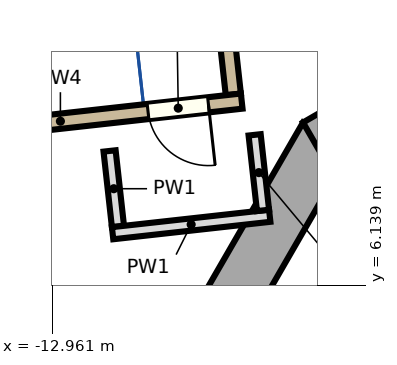
"""IFC4 building model, lengths in metres.
Left out: names, types, materials, properties, quantities, classifications, styles, units other than length and angle.
Written with IfcOpenShell. Run it as: python <this file> out.ifc"""

import sys

from ifc_helpers import new_model, si_unit, direction, frame, frame_2d, origin, place, context, subcontext, project, spatial, rectangle, extrude, element, fill, save


model = new_model("IFC4")
c1 = context("Model", 3, precision=1e-05, world=origin(), true_north=direction((0.0, 1.0)))
c2 = subcontext(c1, "Body", "Model", "MODEL_VIEW")
j1 = project(units=[si_unit("LENGTHUNIT", "METRE"), si_unit("PLANEANGLEUNIT", "RADIAN")], contexts=[c1])
p1 = place(None, origin())
s1 = spatial("IfcSite", under=j1, at=p1, CompositionType="ELEMENT")
p2 = place(p1, origin())
s2 = spatial("IfcBuilding", under=s1, at=p2, CompositionType="ELEMENT")
p3 = place(p2, frame((0.0, 0.0, 37.0)))
s3 = spatial("IfcBuildingStorey", under=s2, at=p3, CompositionType="ELEMENT", Elevation=37.0)
p4 = place(p3, frame((-11.684, 3.01, 0.0), z_axis=(0.0, 0.0, 1.0), x_axis=(0.499990282633, 0.866031014036, 0.0)))
e1 = element("IfcWall", 1, at=p4, inside=s3, PredefinedType="SHEAR", context=c2, shape_type="SweptSolid", body=[
    extrude(rectangle(XDim=6.47, YDim=0.9, at=frame_2d((3.235, 0.0))), origin(), (0.0, 0.0, 1.0), 5.5),
])
p5 = place(p3, frame((-8.614, 8.449, 0.0), z_axis=(0.0, 0.0, 1.0), x_axis=(0.866026961591, 0.49999730179, 0.0)))
e2 = element("IfcWall", 2, at=p5, inside=s3, PredefinedType="SHEAR", context=c2, shape_type="SweptSolid", body=[
    extrude(rectangle(XDim=5.587, YDim=0.9, at=frame_2d((2.794, 0.0))), origin(), (0.0, 0.0, 1.0), 5.5),
])
p6 = place(p3, frame((-11.758, -8.28, 0.0), z_axis=(0.0, 0.0, 1.0), x_axis=(-0.110321610045, 0.993895941413, 0.0)))
e3 = element("IfcWall", 3, at=p6, inside=s3, PredefinedType="PARTITIONING", context=c2, shape_type="SweptSolid", body=[
    extrude(rectangle(XDim=16.577, YDim=0.2, at=frame_2d((8.289, 0.0))), origin(), (0.0, 0.0, 1.0), 4.3),
])
p7 = place(p3, frame((-11.882, 7.128, 0.0), z_axis=(0.0, 0.0, 1.0), x_axis=(-0.110367206513, 0.993890879185, 0.0)))
e4 = element("IfcWall", 4, at=p7, inside=s3, PredefinedType="PARTITIONING", context=c2, shape_type="SweptSolid", body=[
    extrude(rectangle(XDim=1.25, YDim=0.2, at=frame_2d((0.625, 0.0))), origin(), (0.0, 0.0, 1.0), 4.3),
])
p8 = place(p3, frame((-11.971, 7.018, 0.0), z_axis=(0.0, 0.0, 1.0), x_axis=(0.993895180132, 0.110328468272, 0.0)))
e5 = element("IfcWall", 5, at=p8, inside=s3, PredefinedType="PARTITIONING", context=c2, shape_type="SweptSolid", body=[
    extrude(rectangle(XDim=2.6, YDim=0.2, at=frame_2d((1.3, 0.0))), origin(), (0.0, 0.0, 1.0), 4.3),
])
p9 = place(p3, frame((-9.497, 7.393, 0.0), z_axis=(0.0, 0.0, 1.0), x_axis=(-0.110345783203, 0.993893257915, 0.0)))
e6 = element("IfcWall", 6, at=p9, inside=s3, PredefinedType="PARTITIONING", context=c2, shape_type="SweptSolid", body=[
    extrude(rectangle(XDim=1.25, YDim=0.2, at=frame_2d((0.625, 0.0))), origin(), (0.0, 0.0, 1.0), 4.3),
])
p10 = place(p3, frame((-10.3, 12.134, 0.0), z_axis=(0.0, 0.0, 1.0), x_axis=(0.110328108544, -0.993895220063, 0.0)))
e7 = element("IfcWall", 7, at=p10, inside=s3, PredefinedType="SOLIDWALL", context=c2, shape_type="SweptSolid", body=[
    extrude(rectangle(XDim=2.85, YDim=0.25, at=frame_2d((1.425, 0.0))), origin(), (0.0, 0.0, 1.0), 4.3),
])
p11 = place(p3, frame((-9.847, 9.19, 0.0), z_axis=(0.0, 0.0, 1.0), x_axis=(-0.993897125329, -0.110310943534, 0.0)))
e8 = element("IfcWall", 8, at=p11, inside=s3, PredefinedType="SOLIDWALL", context=c2, shape_type="SweptSolid", body=[
    extrude(rectangle(XDim=6.0, YDim=0.25, at=frame_2d((3.0, 0.0))), origin(), (0.0, 0.0, 1.0), 4.3),
])
p12 = place(p11, frame((0.55, 0.0, 0.0)))
e9 = element("IfcOpeningElement", 9, at=p12, cuts=e8, PredefinedType="OPENING", context=c2, shape_type="SweptSolid", body=[
    extrude(rectangle(XDim=1.0, YDim=2.1, at=frame_2d((0.5, 1.05))), frame((0.0, 0.135, 0.0), z_axis=(0.0, -1.0, 0.0), x_axis=(1.0, 0.0, 0.0)), (0.0, 0.0, 1.0), 0.27),
])
p13 = place(p12, origin())
e10 = element("IfcDoor", 10, at=p13, inside=s3, PredefinedType="DOOR", context=c2, shape_type="SweptSolid", body=[
    extrude(rectangle(XDim=1.0, YDim=2.1, at=frame_2d((0.5, 1.05))), frame((0.0, 0.025, 0.0), z_axis=(0.0, -1.0, 0.0), x_axis=(1.0, 0.0, 0.0)), (0.0, 0.0, 1.0), 0.05),
])
fill(e9, e10)
save(model, sys.argv[1])
